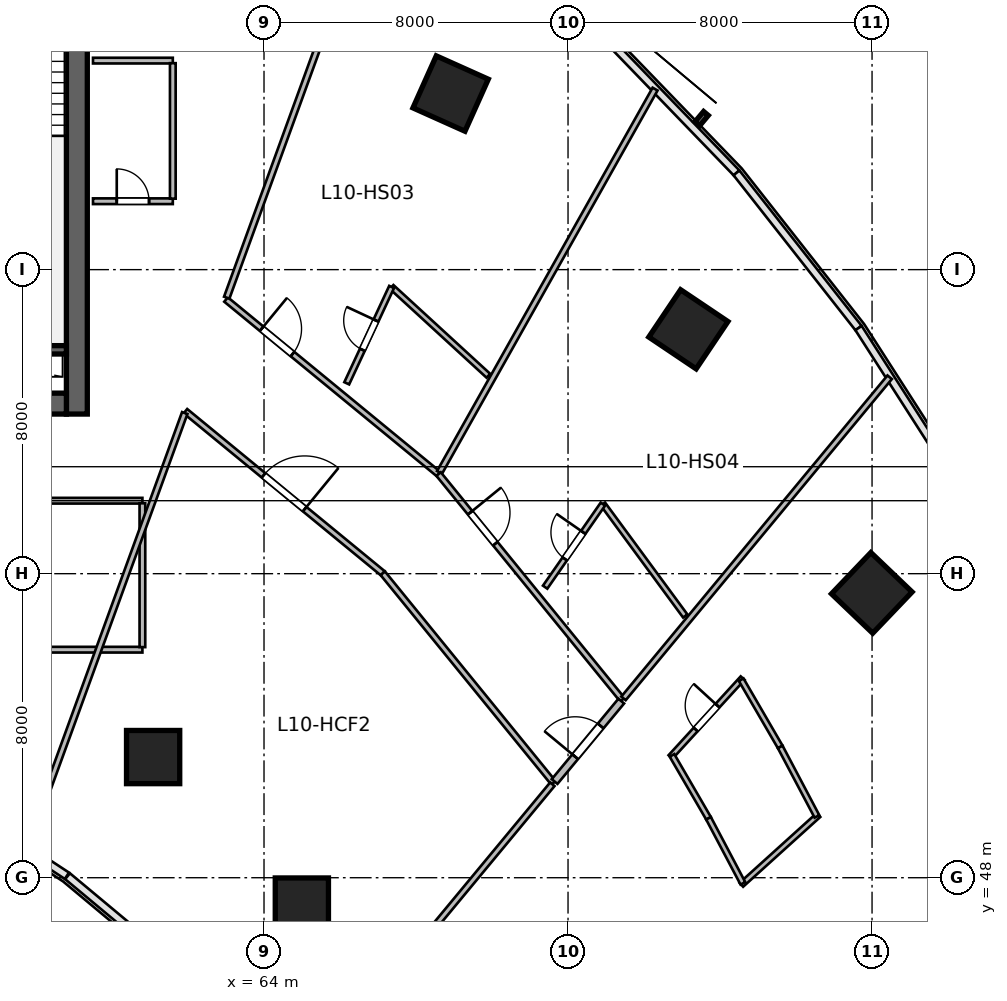
"""IFC4 building model, lengths in metres.
Left out: names, types, materials, properties, quantities, classifications, styles, units other than length and angle.
Written with IfcOpenShell. Run it as: python <this file> out.ifc"""

import sys

from ifc_helpers import new_model, si_unit, direction, frame, frame_2d, origin, origin_2d, place, context, subcontext, project, spatial, rectangle, circle, extrude, source, transform, mapped, element, fill, save


model = new_model("IFC4")
c1 = context("Model", 3, precision=1e-05, world=origin(), true_north=direction((0.0, 1.0)))
c2 = subcontext(c1, "Body", "Model", "MODEL_VIEW")
j1 = project(units=[si_unit("LENGTHUNIT", "METRE"), si_unit("PLANEANGLEUNIT", "RADIAN")], contexts=[c1])
p1 = place(None, origin())
s1 = spatial("IfcSite", under=j1, at=p1, CompositionType="ELEMENT")
p2 = place(p1, origin())
s2 = spatial("IfcBuilding", under=s1, at=p2, CompositionType="ELEMENT")
p3 = place(p2, frame((0.0, 0.0, 49.8)))
s3 = spatial("IfcBuildingStorey", under=s2, at=p3, CompositionType="ELEMENT", Elevation=49.8)
m1 = source(origin(), c2, "Body", "SweptSolid", [
    extrude(rectangle(XDim=12.0, YDim=0.55, at=frame_2d((6.0, 0.0))), origin(), (0.0, 0.0, 1.0), 3.6),
])
p4 = place(p3, frame((59.075, 60.2, 0.0), z_axis=(0.0, 0.0, 1.0), x_axis=(0.0, 1.0, 0.0)))
e1 = element("IfcWall", 1, at=p4, inside=s3, PredefinedType="SHEAR", context=c2, shape_type="MappedRepresentation", body=[
    mapped(m1, transform((0.0, 0.0, 0.0), scale=1.0)),
])
m2 = source(origin(), c2, "Body", "SweptSolid", [
    extrude(rectangle(XDim=21.6, YDim=0.55, at=frame_2d((10.8, 0.0))), origin(), (0.0, 0.0, 1.0), 3.6),
])
p5 = place(p3, frame((37.2, 60.475, 0.0), z_axis=(0.0, 0.0, 1.0), x_axis=(1.0, 0.0, 0.0)))
e2 = element("IfcWall", 2, at=p5, inside=s3, PredefinedType="SHEAR", context=c2, shape_type="MappedRepresentation", body=[
    mapped(m2, transform((0.0, 0.0, 0.0), scale=1.0)),
])
p6 = place(p5, frame((1.1, 0.0, 0.0)))
e3 = element("IfcOpeningElement", 3, at=p6, cuts=e2, PredefinedType="OPENING", context=c2, shape_type="SweptSolid", body=[
    extrude(rectangle(XDim=1.15, YDim=2.15, at=frame_2d((0.575, 1.075))), frame((0.0, 0.285, 0.0), z_axis=(0.0, -1.0, 0.0), x_axis=(1.0, 0.0, 0.0)), (0.0, 0.0, 1.0), 0.57),
])
p7 = place(p5, frame((19.5, 0.0, 0.0)))
e4 = element("IfcOpeningElement", 4, at=p7, cuts=e2, PredefinedType="OPENING", context=c2, shape_type="SweptSolid", body=[
    extrude(rectangle(XDim=0.9, YDim=2.1, at=frame_2d((0.45, 1.05))), frame((0.0, 0.285, 0.0), z_axis=(0.0, -1.0, 0.0), x_axis=(1.0, 0.0, 0.0)), (0.0, 0.0, 1.0), 0.57),
])
p8 = place(p5, frame((12.02, 0.0, 0.0)))
e5 = element("IfcOpeningElement", 5, at=p8, cuts=e2, PredefinedType="OPENING", context=c2, shape_type="SweptSolid", body=[
    extrude(rectangle(XDim=1.6, YDim=2.15, at=frame_2d((0.8, 1.075))), frame((0.0, 0.285, 0.0), z_axis=(0.0, -1.0, 0.0), x_axis=(1.0, 0.0, 0.0)), (0.0, 0.0, 1.0), 0.57),
])
m3 = source(origin(), c2, "Body", "SweptSolid", [
    extrude(rectangle(XDim=3.27, YDim=0.22, at=frame_2d((1.635, 0.0))), origin(), (0.0, 0.0, 1.0), 3.6),
])
p9 = place(p3, frame((55.53, 61.89, 0.0), z_axis=(0.0, 0.0, 1.0), x_axis=(1.0, 0.0, 0.0)))
e6 = element("IfcWall", 6, at=p9, inside=s3, PredefinedType="SHEAR", context=c2, shape_type="MappedRepresentation", body=[
    mapped(m3, transform((0.0, 0.0, 0.0), scale=1.0)),
])
m4 = source(origin(), c2, "Body", "SweptSolid", [
    extrude(circle(Radius=0.7, at=origin_2d()), origin(), (0.0, 0.0, 1.0), 3.6),
])
p10 = place(p3, frame((61.082, 51.175, 0.0), z_axis=(0.0, 0.0, 1.0), x_axis=(0.409126902895, 0.912477494148, 0.0)))
e7 = element("IfcColumn", 7, at=p10, inside=s3, PredefinedType="COLUMN", context=c2, shape_type="MappedRepresentation", body=[
    mapped(m4, transform((0.0, 0.0, 0.0), scale=1.0)),
])
m5 = source(origin(), c2, "Body", "SweptSolid", [
    extrude(rectangle(XDim=1.5, YDim=1.5, at=origin_2d()), origin(), (0.0, 0.0, 1.0), 3.6),
])
p11 = place(p3, frame((68.91, 68.633, 0.0), z_axis=(0.0, 0.0, 1.0), x_axis=(0.409126902895, 0.912477494148, 0.0)))
e8 = element("IfcColumn", 8, at=p11, inside=s3, PredefinedType="COLUMN", context=c2, shape_type="MappedRepresentation", body=[
    mapped(m5, transform((0.0, 0.0, 0.0), scale=1.0)),
])
p12 = place(p3, frame((64.996, 47.294, 0.0), z_axis=(0.0, 0.0, 1.0), x_axis=(0.55774510898, 0.830012285095, 0.0)))
e9 = element("IfcColumn", 9, at=p12, inside=s3, PredefinedType="COLUMN", context=c2, shape_type="MappedRepresentation", body=[
    mapped(m4, transform((0.0, 0.0, 0.0), scale=1.0)),
])
for number, where, z_axis, x_axis in (
    (10, (75.167, 62.43, 0.0), (0.0, 0.0, 1.0), (0.558, 0.83, 0.0)),
    (11, (79.993, 55.494, 0.0), (0.0, 0.0, 1.0), (0.691, 0.723, 0.0)),
):
    element("IfcColumn", number, at=place(p3, frame(where, z_axis=z_axis, x_axis=x_axis)), inside=s3, PredefinedType="COLUMN", context=c2, shape_type="MappedRepresentation", body=[
        mapped(m5, transform((0.0, 0.0, 0.0), scale=1.0)),
    ])
m6 = source(origin(), c2, "Body", "SweptSolid", [
    extrude(rectangle(XDim=2.1, YDim=0.15, at=frame_2d((1.05, 0.0))), origin(), (0.0, 0.0, 1.0), 3.36),
])
p13 = place(p3, frame((59.5, 65.8, 0.0), z_axis=(0.0, 0.0, 1.0), x_axis=(1.0, 0.0, 0.0)))
e12 = element("IfcWall", 12, at=p13, inside=s3, PredefinedType="PARTITIONING", context=c2, shape_type="MappedRepresentation", body=[
    mapped(m6, transform((0.0, 0.0, 0.0), scale=1.0)),
])
p14 = place(p13, frame((0.625, 0.0, 0.0)))
e13 = element("IfcOpeningElement", 13, at=p14, cuts=e12, PredefinedType="OPENING", context=c2, shape_type="SweptSolid", body=[
    extrude(rectangle(XDim=0.85, YDim=2.1, at=frame_2d((0.425, 1.05))), frame((0.0, 0.085, 0.0), z_axis=(0.0, -1.0, 0.0), x_axis=(1.0, 0.0, 0.0)), (0.0, 0.0, 1.0), 0.17),
])
p15 = place(p3, frame((59.5, 69.5, 0.0), z_axis=(0.0, 0.0, 1.0), x_axis=(1.0, 0.0, 0.0)))
e14 = element("IfcWall", 14, at=p15, inside=s3, PredefinedType="PARTITIONING", context=c2, shape_type="MappedRepresentation", body=[
    mapped(m6, transform((0.0, 0.0, 0.0), scale=1.0)),
])
m7 = source(origin(), c2, "Body", "SweptSolid", [
    extrude(rectangle(XDim=3.565, YDim=0.15, at=frame_2d((1.783, 0.0))), origin(), (0.0, 0.0, 1.0), 3.36),
])
p16 = place(p3, frame((61.6, 65.867, 0.0), z_axis=(0.0, 0.0, 1.0), x_axis=(0.0, 1.0, 0.0)))
e15 = element("IfcWall", 15, at=p16, inside=s3, PredefinedType="PARTITIONING", context=c2, shape_type="MappedRepresentation", body=[
    mapped(m7, transform((0.0, 0.0, 0.0), scale=1.0)),
])
m8 = source(origin(), c2, "Body", "SweptSolid", [
    extrude(rectangle(XDim=6.6, YDim=0.15, at=frame_2d((3.3, 0.0))), origin(), (0.0, 0.0, 1.0), 2.803),
])
p17 = place(p3, frame((54.2, 54.0, 0.0), z_axis=(0.0, 0.0, 1.0), x_axis=(1.0, 0.0, 0.0)))
e16 = element("IfcWall", 16, at=p17, inside=s3, PredefinedType="PARTITIONING", context=c2, shape_type="MappedRepresentation", body=[
    mapped(m8, transform((0.0, 0.0, 0.0), scale=1.0)),
])
m9 = source(origin(), c2, "Body", "SweptSolid", [
    extrude(rectangle(XDim=6.6, YDim=0.15, at=frame_2d((3.3, 0.0))), origin(), (0.0, 0.0, 1.0), 3.36),
])
p18 = place(p3, frame((54.2, 57.92, 0.0), z_axis=(0.0, 0.0, 1.0), x_axis=(1.0, 0.0, 0.0)))
e17 = element("IfcWall", 17, at=p18, inside=s3, PredefinedType="PARTITIONING", context=c2, shape_type="MappedRepresentation", body=[
    mapped(m9, transform((0.0, 0.0, 0.0), scale=1.0)),
])
p19 = place(p18, frame((2.825, 0.0, 0.0)))
e18 = element("IfcOpeningElement", 18, at=p19, cuts=e17, PredefinedType="OPENING", context=c2, shape_type="SweptSolid", body=[
    extrude(rectangle(XDim=0.95, YDim=2.1, at=frame_2d((0.475, 1.05))), frame((0.0, 0.085, 0.0), z_axis=(0.0, -1.0, 0.0), x_axis=(1.0, 0.0, 0.0)), (0.0, 0.0, 1.0), 0.17),
])
m10 = source(origin(), c2, "Body", "SweptSolid", [
    extrude(rectangle(XDim=3.785, YDim=0.15, at=frame_2d((1.893, 0.0))), origin(), (0.0, 0.0, 1.0), 3.36),
])
p20 = place(p3, frame((60.8, 54.067, 0.0), z_axis=(0.0, 0.0, 1.0), x_axis=(0.0, 1.0, 0.0)))
e19 = element("IfcWall", 19, at=p20, inside=s3, PredefinedType="PARTITIONING", context=c2, shape_type="MappedRepresentation", body=[
    mapped(m10, transform((0.0, 0.0, 0.0), scale=1.0)),
])
m11 = source(origin(), c2, "Body", "SweptSolid", [
    extrude(rectangle(XDim=7.237, YDim=0.15, at=frame_2d((3.618, 0.0))), origin(), (0.0, 0.0, 1.0), 3.36),
])
p21 = place(p3, frame((63.001, 63.214, 0.0), z_axis=(0.0, 0.0, 1.0), x_axis=(0.772813707793, -0.634632943557, 0.0)))
e20 = element("IfcWall", 20, at=p21, inside=s3, PredefinedType="PARTITIONING", context=c2, shape_type="MappedRepresentation", body=[
    mapped(m11, transform((0.0, 0.0, 0.0), scale=1.0)),
])
p22 = place(p21, frame((1.212, 0.0, 0.0)))
e21 = element("IfcOpeningElement", 21, at=p22, cuts=e20, PredefinedType="OPENING", context=c2, shape_type="SweptSolid", body=[
    extrude(rectangle(XDim=1.05, YDim=2.15, at=frame_2d((0.525, 1.075))), frame((0.0, 0.085, 0.0), z_axis=(0.0, -1.0, 0.0), x_axis=(1.0, 0.0, 0.0)), (0.0, 0.0, 1.0), 0.17),
])
m12 = source(origin(), c2, "Body", "SweptSolid", [
    extrude(rectangle(XDim=12.088, YDim=0.15, at=frame_2d((6.044, 0.0))), origin(), (0.0, 0.0, 1.0), 3.36),
])
p23 = place(p3, frame((63.019, 63.262, 0.0), z_axis=(0.0, 0.0, 1.0), x_axis=(0.34203007529, 0.939689005787, 0.0)))
e22 = element("IfcWall", 22, at=p23, inside=s3, PredefinedType="PARTITIONING", context=c2, shape_type="MappedRepresentation", body=[
    mapped(m12, transform((0.0, 0.0, 0.0), scale=1.0)),
])
m13 = source(origin(), c2, "Body", "SweptSolid", [
    extrude(rectangle(XDim=11.573, YDim=0.15, at=frame_2d((5.786, 0.0))), origin(), (0.0, 0.0, 1.0), 3.36),
])
p24 = place(p3, frame((68.618, 58.664, 0.0), z_axis=(0.0, 0.0, 1.0), x_axis=(0.490161073951, 0.871631872744, 0.0)))
e23 = element("IfcWall", 23, at=p24, inside=s3, PredefinedType="PARTITIONING", context=c2, shape_type="MappedRepresentation", body=[
    mapped(m13, transform((0.0, 0.0, 0.0), scale=1.0)),
])
m14 = source(origin(), c2, "Body", "SweptSolid", [
    extrude(rectangle(XDim=3.456, YDim=0.14, at=frame_2d((1.728, 0.0))), origin(), (0.0, 0.0, 1.0), 3.36),
])
p25 = place(p3, frame((67.358, 63.544, 0.0), z_axis=(0.0, 0.0, 1.0), x_axis=(0.736860870293, -0.676044420013, 0.0)))
e24 = element("IfcWall", 24, at=p25, inside=s3, PredefinedType="PARTITIONING", context=c2, shape_type="MappedRepresentation", body=[
    mapped(m14, transform((0.0, 0.0, 0.0), scale=1.0)),
])
m15 = source(origin(), c2, "Body", "SweptSolid", [
    extrude(rectangle(XDim=2.796, YDim=0.14, at=frame_2d((1.398, 0.0))), origin(), (0.0, 0.0, 1.0), 3.36),
])
p26 = place(p3, frame((66.177, 61.009, 0.0), z_axis=(0.0, 0.0, 1.0), x_axis=(0.422316594955, 0.906448395456, 0.0)))
e25 = element("IfcWall", 25, at=p26, inside=s3, PredefinedType="PARTITIONING", context=c2, shape_type="MappedRepresentation", body=[
    mapped(m15, transform((0.0, 0.0, 0.0), scale=1.0)),
])
p27 = place(p26, frame((0.973, 0.0, 0.0)))
e26 = element("IfcOpeningElement", 26, at=p27, cuts=e25, PredefinedType="OPENING", context=c2, shape_type="SweptSolid", body=[
    extrude(rectangle(XDim=0.85, YDim=2.05, at=frame_2d((0.425, 1.025))), frame((0.0, 0.08, 0.0), z_axis=(0.0, -1.0, 0.0), x_axis=(1.0, 0.0, 0.0)), (0.0, 0.0, 1.0), 0.16),
])
m16 = source(origin(), c2, "Body", "SweptSolid", [
    extrude(rectangle(XDim=7.659, YDim=0.15, at=frame_2d((3.829, 0.0))), origin(), (0.0, 0.0, 1.0), 3.36),
])
p28 = place(p3, frame((68.594, 58.621, 0.0), z_axis=(0.0, 0.0, 1.0), x_axis=(0.631489868862, -0.775384127723, 0.0)))
e27 = element("IfcWall", 27, at=p28, inside=s3, PredefinedType="PARTITIONING", context=c2, shape_type="MappedRepresentation", body=[
    mapped(m16, transform((0.0, 0.0, 0.0), scale=1.0)),
])
p29 = place(p28, frame((1.313, 0.0, 0.0)))
e28 = element("IfcOpeningElement", 28, at=p29, cuts=e27, PredefinedType="OPENING", context=c2, shape_type="SweptSolid", body=[
    extrude(rectangle(XDim=1.05, YDim=2.15, at=frame_2d((0.525, 1.075))), frame((0.0, 0.085, 0.0), z_axis=(0.0, -1.0, 0.0), x_axis=(1.0, 0.0, 0.0)), (0.0, 0.0, 1.0), 0.17),
])
m17 = source(origin(), c2, "Body", "SweptSolid", [
    extrude(rectangle(XDim=10.975, YDim=0.15, at=frame_2d((5.487, 0.0))), origin(), (0.0, 0.0, 1.0), 3.36),
])
p30 = place(p3, frame((73.46, 52.719, 0.0), z_axis=(0.0, 0.0, 1.0), x_axis=(0.638125265812, 0.769932558821, 0.0)))
e29 = element("IfcWall", 29, at=p30, inside=s3, PredefinedType="PARTITIONING", context=c2, shape_type="MappedRepresentation", body=[
    mapped(m17, transform((0.0, 0.0, 0.0), scale=1.0)),
])
m18 = source(origin(), c2, "Body", "SweptSolid", [
    extrude(rectangle(XDim=3.656, YDim=0.14, at=frame_2d((1.828, 0.0))), origin(), (0.0, 0.0, 1.0), 3.36),
])
p31 = place(p3, frame((72.918, 57.831, 0.0), z_axis=(0.0, 0.0, 1.0), x_axis=(0.592700141555, -0.805423206892, 0.0)))
e30 = element("IfcWall", 30, at=p31, inside=s3, PredefinedType="PARTITIONING", context=c2, shape_type="MappedRepresentation", body=[
    mapped(m18, transform((0.0, 0.0, 0.0), scale=1.0)),
])
m19 = source(origin(), c2, "Body", "SweptSolid", [
    extrude(rectangle(XDim=2.663, YDim=0.14, at=frame_2d((1.332, 0.0))), origin(), (0.0, 0.0, 1.0), 3.36),
])
p32 = place(p3, frame((71.397, 55.645, 0.0), z_axis=(0.0, 0.0, 1.0), x_axis=(0.570905989724, 0.821015438891, 0.0)))
e31 = element("IfcWall", 31, at=p32, inside=s3, PredefinedType="PARTITIONING", context=c2, shape_type="MappedRepresentation", body=[
    mapped(m19, transform((0.0, 0.0, 0.0), scale=1.0)),
])
p33 = place(p32, frame((0.906, 0.0, 0.0)))
e32 = element("IfcOpeningElement", 32, at=p33, cuts=e31, PredefinedType="OPENING", context=c2, shape_type="SweptSolid", body=[
    extrude(rectangle(XDim=0.85, YDim=2.05, at=frame_2d((0.425, 1.025))), frame((0.0, 0.08, 0.0), z_axis=(0.0, -1.0, 0.0), x_axis=(1.0, 0.0, 0.0)), (0.0, 0.0, 1.0), 0.16),
])
m20 = source(origin(), c2, "Body", "SweptSolid", [
    extrude(rectangle(XDim=6.721, YDim=0.15, at=frame_2d((3.361, 0.0))), origin(), (0.0, 0.0, 1.0), 3.36),
])
p34 = place(p3, frame((61.931, 60.275, 0.0), z_axis=(0.0, 0.0, 1.0), x_axis=(0.772828051199, -0.63461547671, 0.0)))
e33 = element("IfcWall", 33, at=p34, inside=s3, PredefinedType="PARTITIONING", context=c2, shape_type="MappedRepresentation", body=[
    mapped(m20, transform((0.0, 0.0, 0.0), scale=1.0)),
])
p35 = place(p34, frame((2.66, 0.0, 0.0)))
e34 = element("IfcOpeningElement", 34, at=p35, cuts=e33, PredefinedType="OPENING", context=c2, shape_type="SweptSolid", body=[
    extrude(rectangle(XDim=1.4, YDim=2.15, at=frame_2d((0.7, 1.075))), frame((0.0, 0.085, 0.0), z_axis=(0.0, -1.0, 0.0), x_axis=(1.0, 0.0, 0.0)), (0.0, 0.0, 1.0), 0.17),
])
m21 = source(origin(), c2, "Body", "SweptSolid", [
    extrude(rectangle(XDim=7.113, YDim=0.15, at=frame_2d((3.556, 0.0))), origin(), (0.0, 0.0, 1.0), 3.36),
])
p36 = place(p3, frame((67.126, 56.01, 0.0), z_axis=(0.0, 0.0, 1.0), x_axis=(0.63149032532, -0.775383755974, 0.0)))
e35 = element("IfcWall", 35, at=p36, inside=s3, PredefinedType="PARTITIONING", context=c2, shape_type="MappedRepresentation", body=[
    mapped(m21, transform((0.0, 0.0, 0.0), scale=1.0)),
])
m22 = source(origin(), c2, "Body", "SweptSolid", [
    extrude(rectangle(XDim=12.196, YDim=0.15, at=frame_2d((6.098, 0.0))), origin(), (0.0, 0.0, 1.0), 3.36),
])
p37 = place(p3, frame((57.742, 48.766, 0.0), z_axis=(0.0, 0.0, 1.0), x_axis=(0.342022711534, 0.939691686031, 0.0)))
e36 = element("IfcWall", 36, at=p37, inside=s3, PredefinedType="PARTITIONING", context=c2, shape_type="MappedRepresentation", body=[
    mapped(m22, transform((0.0, 0.0, 0.0), scale=1.0)),
])
m23 = source(origin(), c2, "Body", "SweptSolid", [
    extrude(rectangle(XDim=11.053, YDim=0.15, at=frame_2d((5.527, 0.0))), origin(), (0.0, 0.0, 1.0), 3.36),
])
p38 = place(p3, frame((64.534, 41.949, 0.0), z_axis=(0.0, 0.0, 1.0), x_axis=(0.638131235571, 0.769927611005, 0.0)))
e37 = element("IfcWall", 37, at=p38, inside=s3, PredefinedType="PARTITIONING", context=c2, shape_type="MappedRepresentation", body=[
    mapped(m23, transform((0.0, 0.0, 0.0), scale=1.0)),
])
m24 = source(origin(), c2, "Body", "SweptSolid", [
    extrude(rectangle(XDim=2.748, YDim=0.195, at=frame_2d((1.374, 0.0))), origin(), (0.0, 0.0, 1.0), 3.36),
])
p39 = place(p3, frame((71.647, 50.531, 0.0), z_axis=(0.0, 0.0, 1.0), x_axis=(0.638111168284, 0.769944242729, 0.0)))
e38 = element("IfcWall", 38, at=p39, inside=s3, PredefinedType="PARTITIONING", context=c2, shape_type="MappedRepresentation", body=[
    mapped(m24, transform((0.0, 0.0, 0.0), scale=1.0)),
])
p40 = place(p39, frame((0.849, 0.0, 0.0)))
e39 = element("IfcOpeningElement", 39, at=p40, cuts=e38, PredefinedType="OPENING", context=c2, shape_type="SweptSolid", body=[
    extrude(rectangle(XDim=1.05, YDim=2.15, at=frame_2d((0.525, 1.075))), frame((0.0, 0.107, 0.0), z_axis=(0.0, -1.0, 0.0), x_axis=(1.0, 0.0, 0.0)), (0.0, 0.0, 1.0), 0.215),
])
m25 = source(origin(), c2, "Body", "SweptSolid", [
    extrude(rectangle(XDim=2.812, YDim=0.14, at=frame_2d((1.406, 0.0))), origin(), (0.0, 0.0, 1.0), 3.36),
])
p41 = place(p3, frame((74.697, 51.177, 0.0), z_axis=(0.0, 0.0, 1.0), x_axis=(0.675119025852, 0.737708818527, 0.0)))
e40 = element("IfcWall", 40, at=p41, inside=s3, PredefinedType="PARTITIONING", context=c2, shape_type="MappedRepresentation", body=[
    mapped(m25, transform((0.0, 0.0, 0.0), scale=1.0)),
])
p42 = place(p41, frame((0.981, 0.0, 0.0)))
e41 = element("IfcOpeningElement", 41, at=p42, cuts=e40, PredefinedType="OPENING", context=c2, shape_type="SweptSolid", body=[
    extrude(rectangle(XDim=0.85, YDim=2.05, at=frame_2d((0.425, 1.025))), frame((0.0, 0.08, 0.0), z_axis=(0.0, -1.0, 0.0), x_axis=(1.0, 0.0, 0.0)), (0.0, 0.0, 1.0), 0.16),
])
m26 = source(origin(), c2, "Body", "SweptSolid", [
    extrude(rectangle(XDim=2.738, YDim=0.14, at=frame_2d((1.369, 0.0))), origin(), (0.0, 0.0, 1.0), 3.36),
])
p43 = place(p3, frame((76.56, 47.814, 0.0), z_axis=(0.0, 0.0, 1.0), x_axis=(0.741873676582, 0.670539669218, 0.0)))
e42 = element("IfcWall", 42, at=p43, inside=s3, PredefinedType="PARTITIONING", context=c2, shape_type="MappedRepresentation", body=[
    mapped(m26, transform((0.0, 0.0, 0.0), scale=1.0)),
])
m27 = source(origin(), c2, "Body", "SweptSolid", [
    extrude(rectangle(XDim=1.914, YDim=0.14, at=frame_2d((0.957, 0.0))), origin(), (0.0, 0.0, 1.0), 3.36),
])
p44 = place(p3, frame((74.736, 51.219, 0.0), z_axis=(0.0, 0.0, 1.0), x_axis=(0.502347790612, -0.864665656347, 0.0)))
e43 = element("IfcWall", 43, at=p44, inside=s3, PredefinedType="PARTITIONING", context=c2, shape_type="MappedRepresentation", body=[
    mapped(m27, transform((0.0, 0.0, 0.0), scale=1.0)),
])
m28 = source(origin(), c2, "Body", "SweptSolid", [
    extrude(rectangle(XDim=2.045, YDim=0.14, at=frame_2d((1.022, 0.0))), origin(), (0.0, 0.0, 1.0), 3.36),
])
p45 = place(p3, frame((76.557, 53.209, 0.0), z_axis=(0.0, 0.0, 1.0), x_axis=(0.5023112139, -0.864686905411, 0.0)))
e44 = element("IfcWall", 44, at=p45, inside=s3, PredefinedType="PARTITIONING", context=c2, shape_type="MappedRepresentation", body=[
    mapped(m28, transform((0.0, 0.0, 0.0), scale=1.0)),
])
m29 = source(origin(), c2, "Body", "SweptSolid", [
    extrude(rectangle(XDim=1.936, YDim=0.14, at=frame_2d((0.968, 0.0))), origin(), (0.0, 0.0, 1.0), 3.36),
])
p46 = place(p3, frame((75.697, 49.563, 0.0), z_axis=(0.0, 0.0, 1.0), x_axis=(0.467174971862, -0.884164886017, 0.0)))
e45 = element("IfcWall", 45, at=p46, inside=s3, PredefinedType="PARTITIONING", context=c2, shape_type="MappedRepresentation", body=[
    mapped(m29, transform((0.0, 0.0, 0.0), scale=1.0)),
])
m30 = source(origin(), c2, "Body", "SweptSolid", [
    extrude(rectangle(XDim=2.068, YDim=0.14, at=frame_2d((1.034, 0.0))), origin(), (0.0, 0.0, 1.0), 3.36),
])
p47 = place(p3, frame((77.584, 51.441, 0.0), z_axis=(0.0, 0.0, 1.0), x_axis=(0.467215057643, -0.884143704333, 0.0)))
e46 = element("IfcWall", 46, at=p47, inside=s3, PredefinedType="PARTITIONING", context=c2, shape_type="MappedRepresentation", body=[
    mapped(m30, transform((0.0, 0.0, 0.0), scale=1.0)),
])
m31 = source(origin(), c2, "Body", "SweptSolid", [
    extrude(rectangle(XDim=0.85, YDim=2.1, at=frame_2d((0.425, 1.05))), frame((0.0, 0.025, 0.0), z_axis=(0.0, -1.0, 0.0), x_axis=(1.0, 0.0, 0.0)), (0.0, 0.0, 1.0), 0.05),
])
p48 = place(p14, origin())
e47 = element("IfcDoor", 47, at=p48, inside=s3, OperationType="SINGLE_SWING_LEFT", PredefinedType="DOOR", context=c2, shape_type="MappedRepresentation", body=[
    mapped(m31, transform((0.0, 0.0, 0.0), scale=1.0)),
])
fill(e13, e47)
m32 = source(origin(), c2, "Body", "SweptSolid", [
    extrude(rectangle(XDim=1.05, YDim=2.15, at=frame_2d((0.525, 1.075))), frame((0.0, 0.025, 0.0), z_axis=(0.0, -1.0, 0.0), x_axis=(1.0, 0.0, 0.0)), (0.0, 0.0, 1.0), 0.05),
])
p49 = place(p22, origin())
e48 = element("IfcDoor", 48, at=p49, inside=s3, OperationType="SINGLE_SWING_LEFT", PredefinedType="DOOR", context=c2, shape_type="MappedRepresentation", body=[
    mapped(m32, transform((0.0, 0.0, 0.0), scale=1.0)),
])
fill(e21, e48)
m33 = source(origin(), c2, "Body", "SweptSolid", [
    extrude(rectangle(XDim=0.85, YDim=2.05, at=frame_2d((0.425, 1.025))), frame((0.0, 0.025, 0.0), z_axis=(0.0, -1.0, 0.0), x_axis=(1.0, 0.0, 0.0)), (0.0, 0.0, 1.0), 0.05),
])
p50 = place(p27, origin())
e49 = element("IfcDoor", 49, at=p50, inside=s3, OperationType="SINGLE_SWING_RIGHT", PredefinedType="DOOR", context=c2, shape_type="MappedRepresentation", body=[
    mapped(m33, transform((0.0, 0.0, 0.0), scale=1.0)),
])
fill(e26, e49)
p51 = place(p29, origin())
e50 = element("IfcDoor", 50, at=p51, inside=s3, OperationType="SINGLE_SWING_LEFT", PredefinedType="DOOR", context=c2, shape_type="MappedRepresentation", body=[
    mapped(m32, transform((0.0, 0.0, 0.0), scale=1.0)),
])
fill(e28, e50)
p52 = place(p33, origin())
e51 = element("IfcDoor", 51, at=p52, inside=s3, OperationType="SINGLE_SWING_RIGHT", PredefinedType="DOOR", context=c2, shape_type="MappedRepresentation", body=[
    mapped(m33, transform((0.0, 0.0, 0.0), scale=1.0)),
])
fill(e32, e51)
m34 = source(origin(), c2, "Body", "SweptSolid", [
    extrude(rectangle(XDim=1.4, YDim=2.15, at=frame_2d((0.7, 1.075))), frame((0.0, 0.025, 0.0), z_axis=(0.0, -1.0, 0.0), x_axis=(1.0, 0.0, 0.0)), (0.0, 0.0, 1.0), 0.05),
])
p53 = place(p35, origin())
e52 = element("IfcDoor", 52, at=p53, inside=s3, OperationType="SINGLE_SWING_RIGHT", PredefinedType="DOOR", context=c2, shape_type="MappedRepresentation", body=[
    mapped(m34, transform((0.0, 0.0, 0.0), scale=1.0)),
])
fill(e34, e52)
p54 = place(p40, origin())
e53 = element("IfcDoor", 53, at=p54, inside=s3, OperationType="SINGLE_SWING_LEFT", PredefinedType="DOOR", context=c2, shape_type="MappedRepresentation", body=[
    mapped(m32, transform((0.0, 0.0, 0.0), scale=1.0)),
])
fill(e39, e53)
p55 = place(p42, origin())
e54 = element("IfcDoor", 54, at=p55, inside=s3, OperationType="SINGLE_SWING_RIGHT", PredefinedType="DOOR", context=c2, shape_type="MappedRepresentation", body=[
    mapped(m33, transform((0.0, 0.0, 0.0), scale=1.0)),
])
fill(e41, e54)
save(model, sys.argv[1])
